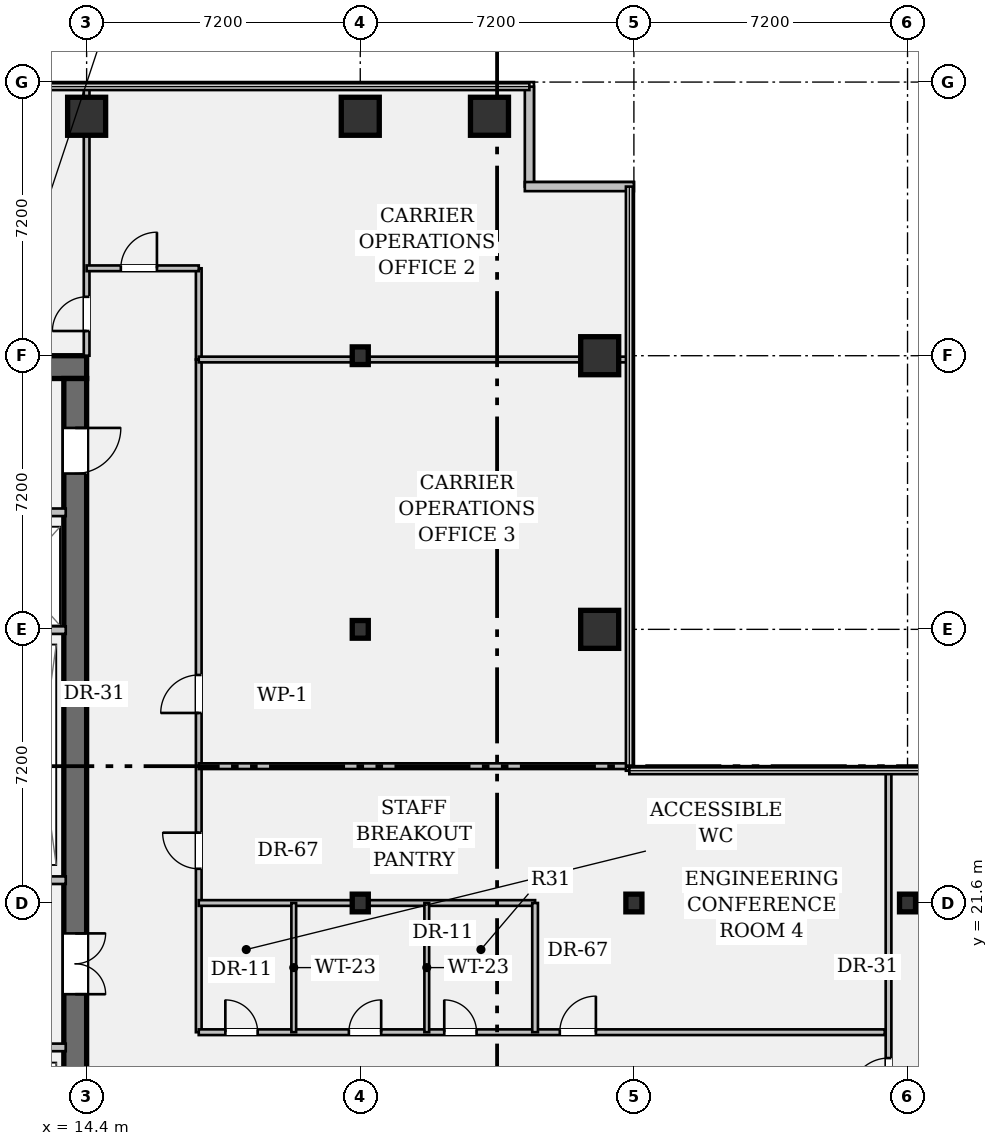
"""IFC4 building model, lengths in metres.
Left out: names, types, materials, properties, quantities, classifications, styles, units other than length and angle.
Written with IfcOpenShell. Run it as: python <this file> out.ifc"""

import sys

from ifc_helpers import new_model, si_unit, direction, frame, frame_2d, origin, origin_2d, place, context, subcontext, project, spatial, rectangle, hollow_rectangle, i_section, extrude, element, fill, save


model = new_model("IFC4")
c1 = context("Model", 3, precision=1e-05, world=origin(), true_north=direction((0.0, 1.0)))
c2 = subcontext(c1, "Body", "Model", "MODEL_VIEW")
j1 = project(units=[si_unit("LENGTHUNIT", "METRE"), si_unit("PLANEANGLEUNIT", "RADIAN")], contexts=[c1])
p1 = place(None, origin())
s1 = spatial("IfcSite", under=j1, at=p1, CompositionType="ELEMENT")
p2 = place(p1, origin())
s2 = spatial("IfcBuilding", under=s1, at=p2, CompositionType="ELEMENT")
p3 = place(p2, frame((0.0, 0.0, 46.55)))
s3 = spatial("IfcBuildingStorey", under=s2, at=p3, CompositionType="ELEMENT", Elevation=46.55)
p4 = place(p3, frame((0.6, 35.7, 0.0), z_axis=(0.0, 0.0, 1.0), x_axis=(1.0, 0.0, 0.0)))
e1 = element("IfcWall", 1, at=p4, inside=s3, PredefinedType="SHEAR", context=c2, shape_type="SweptSolid", body=[
    extrude(rectangle(XDim=13.8, YDim=0.6, at=frame_2d((6.9, 0.0))), origin(), (0.0, 0.0, 1.0), 3.57),
])
p5 = place(p3, frame((14.1, 35.4, 0.0), z_axis=(0.0, 0.0, 1.0), x_axis=(0.0, -1.0, 0.0)))
e2 = element("IfcWall", 2, at=p5, inside=s3, PredefinedType="SHEAR", context=c2, shape_type="SweptSolid", body=[
    extrude(rectangle(XDim=27.6, YDim=0.6, at=frame_2d((13.8, 0.0))), origin(), (0.0, 0.0, 1.0), 3.57),
])
p6 = place(p5, frame((1.3, 0.0, 0.0)))
e3 = element("IfcOpeningElement", 3, at=p6, cuts=e2, PredefinedType="OPENING", context=c2, shape_type="SweptSolid", body=[
    extrude(rectangle(XDim=1.2, YDim=2.15, at=frame_2d((0.6, 1.075))), frame((0.0, 0.312, 0.0), z_axis=(0.0, -1.0, 0.0), x_axis=(1.0, 0.0, 0.0)), (0.0, 0.0, 1.0), 0.624),
])
p7 = place(p5, frame((25.25, 0.0, 0.0)))
e4 = element("IfcOpeningElement", 4, at=p7, cuts=e2, PredefinedType="OPENING", context=c2, shape_type="SweptSolid", body=[
    extrude(rectangle(XDim=1.2, YDim=2.15, at=frame_2d((0.6, 1.075))), frame((0.0, 0.312, 0.0), z_axis=(0.0, -1.0, 0.0), x_axis=(1.0, 0.0, 0.0)), (0.0, 0.0, 1.0), 0.624),
])
p8 = place(p5, frame((14.6, 0.0, 0.0)))
e5 = element("IfcOpeningElement", 5, at=p8, cuts=e2, PredefinedType="OPENING", context=c2, shape_type="SweptSolid", body=[
    extrude(rectangle(XDim=1.6, YDim=2.2, at=frame_2d((0.8, 1.1))), frame((0.0, 0.312, 0.0), z_axis=(0.0, -1.0, 0.0), x_axis=(1.0, 0.0, 0.0)), (0.0, 0.0, 1.0), 0.624),
])
p9 = place(p3, frame((14.4, 42.3, 0.0), z_axis=(0.0, 0.0, 1.0), x_axis=(1.0, 0.0, 0.0)))
e6 = element("IfcColumn", 6, at=p9, inside=s3, PredefinedType="COLUMN", context=c2, shape_type="SweptSolid", body=[
    extrude(hollow_rectangle(XDim=1.0, YDim=1.0, WallThickness=0.065, at=origin_2d()), origin(), (0.0, 0.0, 1.0), 3.57),
])
for number, where, z_axis, x_axis in (
    (7, (21.6, 21.6, 0.0), (0.0, 0.0, 1.0), (1.0, 0.0, 0.0)),
    (8, (21.6, 28.8, 0.0), (0.0, 0.0, 1.0), (1.0, 0.0, 0.0)),
    (9, (21.6, 36.0, 0.0), (0.0, 0.0, 1.0), (1.0, 0.0, 0.0)),
):
    element("IfcColumn", number, at=place(p3, frame(where, z_axis=z_axis, x_axis=x_axis)), inside=s3, PredefinedType="COLUMN", context=c2, shape_type="SweptSolid", body=[
        extrude(i_section(OverallWidth=0.422, OverallDepth=0.465, WebThickness=0.045, FlangeThickness=0.073, FilletRadius=0.018, at=origin_2d()), origin(), (0.0, 0.0, 1.0), 3.57),
    ])
for number, where, z_axis, x_axis in (
    (10, (21.6, 42.3, 0.0), (0.0, 0.0, 1.0), (1.0, 0.0, 0.0)),
    (11, (25.0, 42.3, 0.0), (0.0, 0.0, 1.0), (1.0, 0.0, 0.0)),
    (12, (27.9, 28.8, 0.0), (0.0, 0.0, 1.0), (1.0, 0.0, 0.0)),
    (13, (27.9, 36.0, 0.0), (0.0, 0.0, 1.0), (1.0, 0.0, 0.0)),
):
    element("IfcColumn", number, at=place(p3, frame(where, z_axis=z_axis, x_axis=x_axis)), inside=s3, PredefinedType="COLUMN", context=c2, shape_type="SweptSolid", body=[
        extrude(hollow_rectangle(XDim=1.0, YDim=1.0, WallThickness=0.065, at=origin_2d()), origin(), (0.0, 0.0, 1.0), 3.57),
    ])
for number, where, z_axis, x_axis in (
    (14, (28.8, 21.6, 0.0), (0.0, 0.0, 1.0), (1.0, 0.0, 0.0)),
    (15, (36.0, 21.6, 0.0), (0.0, 0.0, 1.0), (1.0, 0.0, 0.0)),
):
    element("IfcColumn", number, at=place(p3, frame(where, z_axis=z_axis, x_axis=x_axis)), inside=s3, PredefinedType="COLUMN", context=c2, shape_type="SweptSolid", body=[
        extrude(i_section(OverallWidth=0.422, OverallDepth=0.465, WebThickness=0.045, FlangeThickness=0.073, FilletRadius=0.018, at=origin_2d()), origin(), (0.0, 0.0, 1.0), 3.57),
    ])
p10 = place(p3, frame((26.05, 43.08, 0.0), z_axis=(0.0, 0.0, 1.0), x_axis=(0.0, -1.0, 0.0)))
e16 = element("IfcWall", 16, at=p10, inside=s3, PredefinedType="STANDARD", context=c2, shape_type="SweptSolid", body=[
    extrude(rectangle(XDim=2.63, YDim=0.24, at=frame_2d((1.315, 0.0))), origin(), (0.0, 0.0, 1.0), 3.57),
])
p11 = place(p3, frame((25.93, 40.45, 0.0), z_axis=(0.0, 0.0, 1.0), x_axis=(1.0, 0.0, 0.0)))
e17 = element("IfcWall", 17, at=p11, inside=s3, PredefinedType="STANDARD", context=c2, shape_type="SweptSolid", body=[
    extrude(rectangle(XDim=2.87, YDim=0.24, at=frame_2d((1.435, 0.0))), origin(), (0.0, 0.0, 1.0), 3.57),
])
p12 = place(p3, frame((8.7, 31.88, 0.0), z_axis=(0.0, 0.0, 1.0), x_axis=(1.0, 0.0, 0.0)))
e18 = element("IfcWall", 18, at=p12, inside=s3, PredefinedType="PARTITIONING", context=c2, shape_type="SweptSolid", body=[
    extrude(rectangle(XDim=5.15, YDim=0.2, at=frame_2d((2.575, 0.0))), origin(), (0.0, 0.0, 1.0), 3.57),
])
p13 = place(p12, frame((0.75, 0.0, 0.0)))
e19 = element("IfcOpeningElement", 19, at=p13, cuts=e18, PredefinedType="OPENING", context=c2, shape_type="SweptSolid", body=[
    extrude(rectangle(XDim=1.2, YDim=2.2, at=frame_2d((0.6, 1.1))), frame((0.0, 0.112, 0.0), z_axis=(0.0, -1.0, 0.0), x_axis=(1.0, 0.0, 0.0)), (0.0, 0.0, 1.0), 0.224),
])
p14 = place(p12, frame((3.25, 0.0, 0.0)))
e20 = element("IfcOpeningElement", 20, at=p14, cuts=e18, PredefinedType="OPENING", context=c2, shape_type="SweptSolid", body=[
    extrude(rectangle(XDim=1.2, YDim=2.2, at=frame_2d((0.6, 1.1))), frame((0.0, 0.112, 0.0), z_axis=(0.0, -1.0, 0.0), x_axis=(1.0, 0.0, 0.0)), (0.0, 0.0, 1.0), 0.224),
])
p15 = place(p3, frame((8.7, 28.78, 0.0), z_axis=(0.0, 0.0, 1.0), x_axis=(1.0, 0.0, 0.0)))
e21 = element("IfcWall", 21, at=p15, inside=s3, PredefinedType="PARTITIONING", context=c2, shape_type="SweptSolid", body=[
    extrude(rectangle(XDim=5.15, YDim=0.2, at=frame_2d((2.575, 0.0))), origin(), (0.0, 0.0, 1.0), 3.57),
])
for number, where, z_axis, x_axis in (
    (22, (7.1, 22.2, 0.0), (0.0, 0.0, 1.0), (1.0, 0.0, 0.0)),
    (23, (7.1, 17.8, 0.0), (0.0, 0.0, 1.0), (1.0, 0.0, 0.0)),
):
    element("IfcWall", number, at=place(p3, frame(where, z_axis=z_axis, x_axis=x_axis)), inside=s3, PredefinedType="PARTITIONING", context=c2, shape_type="SweptSolid", body=[
        extrude(rectangle(XDim=6.75, YDim=0.2, at=frame_2d((3.375, 0.0))), origin(), (0.0, 0.0, 1.0), 3.57),
    ])
p16 = place(p3, frame((17.35, 18.2, 0.0), z_axis=(0.0, 0.0, 1.0), x_axis=(0.0, 1.0, 0.0)))
e24 = element("IfcWall", 24, at=p16, inside=s3, PredefinedType="PARTITIONING", context=c2, shape_type="SweptSolid", body=[
    extrude(rectangle(XDim=17.7, YDim=0.15, at=frame_2d((8.85, 0.0))), origin(), (0.0, 0.0, 1.0), 2.699),
])
p17 = place(p16, frame((4.3, 0.0, 0.0)))
e25 = element("IfcOpeningElement", 25, at=p17, cuts=e24, PredefinedType="OPENING", context=c2, shape_type="SweptSolid", body=[
    extrude(rectangle(XDim=0.95, YDim=2.15, at=frame_2d((0.475, 1.075))), frame((0.0, 0.087, 0.0), z_axis=(0.0, -1.0, 0.0), x_axis=(1.0, 0.0, 0.0)), (0.0, 0.0, 1.0), 0.174),
])
p18 = place(p16, frame((8.4, 0.0, 0.0)))
e26 = element("IfcOpeningElement", 26, at=p18, cuts=e24, PredefinedType="OPENING", context=c2, shape_type="SweptSolid", body=[
    extrude(rectangle(XDim=1.0, YDim=2.15, at=frame_2d((0.5, 1.075))), frame((0.0, 0.087, 0.0), z_axis=(0.0, -1.0, 0.0), x_axis=(1.0, 0.0, 0.0)), (0.0, 0.0, 1.0), 0.174),
])
p19 = place(p3, frame((17.35, 18.2, 0.0), z_axis=(0.0, 0.0, 1.0), x_axis=(1.0, 0.0, 0.0)))
e27 = element("IfcWall", 27, at=p19, inside=s3, PredefinedType="PARTITIONING", context=c2, shape_type="SweptSolid", body=[
    extrude(rectangle(XDim=18.05, YDim=0.15, at=frame_2d((9.025, 0.0))), origin(), (0.0, 0.0, 1.0), 2.699),
])
p20 = place(p19, frame((0.7, 0.0, 0.0)))
e28 = element("IfcOpeningElement", 28, at=p20, cuts=e27, PredefinedType="OPENING", context=c2, shape_type="SweptSolid", body=[
    extrude(rectangle(XDim=0.85, YDim=2.15, at=frame_2d((0.425, 1.075))), frame((0.0, 0.087, 0.0), z_axis=(0.0, -1.0, 0.0), x_axis=(1.0, 0.0, 0.0)), (0.0, 0.0, 1.0), 0.174),
])
p21 = place(p19, frame((3.95, 0.0, 0.0)))
e29 = element("IfcOpeningElement", 29, at=p21, cuts=e27, PredefinedType="OPENING", context=c2, shape_type="SweptSolid", body=[
    extrude(rectangle(XDim=0.85, YDim=2.15, at=frame_2d((0.425, 1.075))), frame((0.0, 0.087, 0.0), z_axis=(0.0, -1.0, 0.0), x_axis=(1.0, 0.0, 0.0)), (0.0, 0.0, 1.0), 0.174),
])
p22 = place(p19, frame((6.46, 0.0, 0.0)))
e30 = element("IfcOpeningElement", 30, at=p22, cuts=e27, PredefinedType="OPENING", context=c2, shape_type="SweptSolid", body=[
    extrude(rectangle(XDim=0.85, YDim=2.15, at=frame_2d((0.425, 1.075))), frame((0.0, 0.087, 0.0), z_axis=(0.0, -1.0, 0.0), x_axis=(1.0, 0.0, 0.0)), (0.0, 0.0, 1.0), 0.174),
])
p23 = place(p19, frame((9.5, 0.0, 0.0)))
e31 = element("IfcOpeningElement", 31, at=p23, cuts=e27, PredefinedType="OPENING", context=c2, shape_type="SweptSolid", body=[
    extrude(rectangle(XDim=0.95, YDim=2.15, at=frame_2d((0.475, 1.075))), frame((0.0, 0.087, 0.0), z_axis=(0.0, -1.0, 0.0), x_axis=(1.0, 0.0, 0.0)), (0.0, 0.0, 1.0), 0.174),
])
p24 = place(p3, frame((35.5, 0.12, 0.0), z_axis=(0.0, 0.0, 1.0), x_axis=(0.0, 1.0, 0.0)))
e32 = element("IfcWall", 32, at=p24, inside=s3, PredefinedType="PARTITIONING", context=c2, shape_type="SweptSolid", body=[
    extrude(rectangle(XDim=24.96, YDim=0.15, at=frame_2d((12.48, 0.0))), origin(), (0.0, 0.0, 1.0), 2.699),
])
p25 = place(p24, frame((16.4, 0.0, 0.0)))
e33 = element("IfcOpeningElement", 33, at=p25, cuts=e32, PredefinedType="OPENING", context=c2, shape_type="SweptSolid", body=[
    extrude(rectangle(XDim=1.0, YDim=2.15, at=frame_2d((0.5, 1.075))), frame((0.0, 0.087, 0.0), z_axis=(0.0, -1.0, 0.0), x_axis=(1.0, 0.0, 0.0)), (0.0, 0.0, 1.0), 0.174),
])
p26 = place(p3, frame((14.4, 36.0, 0.0), z_axis=(0.0, 0.0, 1.0), x_axis=(0.0, 1.0, 0.0)))
e34 = element("IfcWall", 34, at=p26, inside=s3, PredefinedType="PARTITIONING", context=c2, shape_type="SweptSolid", body=[
    extrude(rectangle(XDim=7.08, YDim=0.15, at=frame_2d((3.54, 0.0))), origin(), (0.0, 0.0, 1.0), 2.699),
])
p27 = place(p26, frame((0.65, 0.0, 0.0)))
e35 = element("IfcOpeningElement", 35, at=p27, cuts=e34, PredefinedType="OPENING", context=c2, shape_type="SweptSolid", body=[
    extrude(rectangle(XDim=0.9, YDim=2.15, at=frame_2d((0.45, 1.075))), frame((0.0, 0.087, 0.0), z_axis=(0.0, -1.0, 0.0), x_axis=(1.0, 0.0, 0.0)), (0.0, 0.0, 1.0), 0.174),
])
p28 = place(p3, frame((17.35, 35.9, 0.0), z_axis=(0.0, 0.0, 1.0), x_axis=(0.0, 1.0, 0.0)))
e36 = element("IfcWall", 36, at=p28, inside=s3, PredefinedType="PARTITIONING", context=c2, shape_type="SweptSolid", body=[
    extrude(rectangle(XDim=2.4, YDim=0.15, at=frame_2d((1.2, 0.0))), origin(), (0.0, 0.0, 1.0), 2.699),
])
p29 = place(p3, frame((14.4, 38.3, 0.0), z_axis=(0.0, 0.0, 1.0), x_axis=(1.0, 0.0, 0.0)))
e37 = element("IfcWall", 37, at=p29, inside=s3, PredefinedType="PARTITIONING", context=c2, shape_type="SweptSolid", body=[
    extrude(rectangle(XDim=2.95, YDim=0.15, at=frame_2d((1.475, 0.0))), origin(), (0.0, 0.0, 1.0), 2.699),
])
p30 = place(p29, frame((0.9, 0.0, 0.0)))
e38 = element("IfcOpeningElement", 38, at=p30, cuts=e37, PredefinedType="OPENING", context=c2, shape_type="SweptSolid", body=[
    extrude(rectangle(XDim=0.95, YDim=2.15, at=frame_2d((0.475, 1.075))), frame((0.0, 0.087, 0.0), z_axis=(0.0, -1.0, 0.0), x_axis=(1.0, 0.0, 0.0)), (0.0, 0.0, 1.0), 0.174),
])
p31 = place(p3, frame((17.35, 35.9, 0.0), z_axis=(0.0, 0.0, 1.0), x_axis=(1.0, 0.0, 0.0)))
e39 = element("IfcWall", 39, at=p31, inside=s3, PredefinedType="PARTITIONING", context=c2, shape_type="SweptSolid", body=[
    extrude(rectangle(XDim=11.33, YDim=0.15, at=frame_2d((5.665, 0.0))), origin(), (0.0, 0.0, 1.0), 2.699),
])
p32 = place(p3, frame((17.35, 21.6, 0.0), z_axis=(0.0, 0.0, 1.0), x_axis=(1.0, 0.0, 0.0)))
e40 = element("IfcWall", 40, at=p32, inside=s3, PredefinedType="PARTITIONING", context=c2, shape_type="SweptSolid", body=[
    extrude(rectangle(XDim=8.85, YDim=0.15, at=frame_2d((4.425, 0.0))), origin(), (0.0, 0.0, 1.0), 2.699),
])
p33 = place(p3, frame((26.2, 18.2, 0.0), z_axis=(0.0, 0.0, 1.0), x_axis=(0.0, 1.0, 0.0)))
e41 = element("IfcWall", 41, at=p33, inside=s3, PredefinedType="PARTITIONING", context=c2, shape_type="SweptSolid", body=[
    extrude(rectangle(XDim=3.4, YDim=0.15, at=frame_2d((1.7, 0.0))), origin(), (0.0, 0.0, 1.0), 2.699),
])
for number, where, z_axis, x_axis in (
    (42, (19.85, 18.2, 0.0), (0.0, 0.0, 1.0), (0.0, 1.0, 0.0)),
    (43, (23.35, 18.2, 0.0), (0.0, 0.0, 1.0), (0.0, 1.0, 0.0)),
):
    element("IfcWall", number, at=place(p3, frame(where, z_axis=z_axis, x_axis=x_axis)), inside=s3, PredefinedType="PARTITIONING", context=c2, shape_type="SweptSolid", body=[
        extrude(rectangle(XDim=3.4, YDim=0.125, at=frame_2d((1.7, 0.0))), origin(), (0.0, 0.0, 1.0), 2.699),
    ])
p34 = place(p3, frame((17.35, 25.2, 0.0), z_axis=(0.0, 0.0, 1.0), x_axis=(1.0, 0.0, 0.0)))
e44 = element("IfcWall", 44, at=p34, inside=s3, PredefinedType="PARTITIONING", context=c2, shape_type="SweptSolid", body=[
    extrude(rectangle(XDim=11.33, YDim=0.15, at=frame_2d((5.665, 0.0))), origin(), (0.0, 0.0, 1.0), 2.699),
])
p35 = place(p6, origin())
e45 = element("IfcDoor", 45, at=p35, inside=s3, OperationType="SINGLE_SWING_LEFT", PredefinedType="DOOR", context=c2, shape_type="SweptSolid", body=[
    extrude(rectangle(XDim=1.2, YDim=2.15, at=frame_2d((0.6, 1.075))), frame((0.0, 0.025, 0.0), z_axis=(0.0, -1.0, 0.0), x_axis=(1.0, 0.0, 0.0)), (0.0, 0.0, 1.0), 0.05),
])
fill(e3, e45)
p36 = place(p8, origin())
e46 = element("IfcDoor", 46, at=p36, inside=s3, OperationType="DOUBLE_DOOR_SINGLE_SWING", PredefinedType="DOOR", context=c2, shape_type="SweptSolid", body=[
    extrude(rectangle(XDim=1.6, YDim=2.2, at=frame_2d((0.8, 1.1))), frame((0.0, 0.025, 0.0), z_axis=(0.0, -1.0, 0.0), x_axis=(1.0, 0.0, 0.0)), (0.0, 0.0, 1.0), 0.05),
])
fill(e5, e46)
p37 = place(p27, origin())
e47 = element("IfcDoor", 47, at=p37, inside=s3, OperationType="SINGLE_SWING_LEFT", PredefinedType="DOOR", context=c2, shape_type="SweptSolid", body=[
    extrude(rectangle(XDim=0.9, YDim=2.15, at=frame_2d((0.45, 1.075))), frame((0.0, 0.025, 0.0), z_axis=(0.0, -1.0, 0.0), x_axis=(1.0, 0.0, 0.0)), (0.0, 0.0, 1.0), 0.05),
])
fill(e35, e47)
p38 = place(p30, origin())
e48 = element("IfcDoor", 48, at=p38, inside=s3, OperationType="SINGLE_SWING_RIGHT", PredefinedType="DOOR", context=c2, shape_type="SweptSolid", body=[
    extrude(rectangle(XDim=0.95, YDim=2.15, at=frame_2d((0.475, 1.075))), frame((0.0, 0.025, 0.0), z_axis=(0.0, -1.0, 0.0), x_axis=(1.0, 0.0, 0.0)), (0.0, 0.0, 1.0), 0.05),
])
fill(e38, e48)
p39 = place(p20, origin())
e49 = element("IfcDoor", 49, at=p39, inside=s3, OperationType="SINGLE_SWING_LEFT", PredefinedType="DOOR", context=c2, shape_type="SweptSolid", body=[
    extrude(rectangle(XDim=0.85, YDim=2.15, at=frame_2d((0.425, 1.075))), frame((0.0, 0.025, 0.0), z_axis=(0.0, -1.0, 0.0), x_axis=(1.0, 0.0, 0.0)), (0.0, 0.0, 1.0), 0.05),
])
fill(e28, e49)
p40 = place(p21, origin())
e50 = element("IfcDoor", 50, at=p40, inside=s3, OperationType="SINGLE_SWING_RIGHT", PredefinedType="DOOR", context=c2, shape_type="SweptSolid", body=[
    extrude(rectangle(XDim=0.85, YDim=2.15, at=frame_2d((0.425, 1.075))), frame((0.0, 0.025, 0.0), z_axis=(0.0, -1.0, 0.0), x_axis=(1.0, 0.0, 0.0)), (0.0, 0.0, 1.0), 0.05),
])
fill(e29, e50)
p41 = place(p22, origin())
e51 = element("IfcDoor", 51, at=p41, inside=s3, OperationType="SINGLE_SWING_LEFT", PredefinedType="DOOR", context=c2, shape_type="SweptSolid", body=[
    extrude(rectangle(XDim=0.85, YDim=2.15, at=frame_2d((0.425, 1.075))), frame((0.0, 0.025, 0.0), z_axis=(0.0, -1.0, 0.0), x_axis=(1.0, 0.0, 0.0)), (0.0, 0.0, 1.0), 0.05),
])
fill(e30, e51)
p42 = place(p17, origin())
e52 = element("IfcDoor", 52, at=p42, inside=s3, OperationType="SINGLE_SWING_RIGHT", PredefinedType="DOOR", context=c2, shape_type="SweptSolid", body=[
    extrude(rectangle(XDim=0.95, YDim=2.15, at=frame_2d((0.475, 1.075))), frame((0.0, 0.025, 0.0), z_axis=(0.0, -1.0, 0.0), x_axis=(1.0, 0.0, 0.0)), (0.0, 0.0, 1.0), 0.05),
])
fill(e25, e52)
p43 = place(p18, origin())
e53 = element("IfcDoor", 53, at=p43, inside=s3, OperationType="SINGLE_SWING_LEFT", PredefinedType="DOOR", context=c2, shape_type="SweptSolid", body=[
    extrude(rectangle(XDim=1.0, YDim=2.15, at=frame_2d((0.5, 1.075))), frame((0.0, 0.025, 0.0), z_axis=(0.0, -1.0, 0.0), x_axis=(1.0, 0.0, 0.0)), (0.0, 0.0, 1.0), 0.05),
])
fill(e26, e53)
p44 = place(p23, origin())
e54 = element("IfcDoor", 54, at=p44, inside=s3, OperationType="SINGLE_SWING_RIGHT", PredefinedType="DOOR", context=c2, shape_type="SweptSolid", body=[
    extrude(rectangle(XDim=0.95, YDim=2.15, at=frame_2d((0.475, 1.075))), frame((0.0, 0.025, 0.0), z_axis=(0.0, -1.0, 0.0), x_axis=(1.0, 0.0, 0.0)), (0.0, 0.0, 1.0), 0.05),
])
fill(e31, e54)
p45 = place(p25, origin())
e55 = element("IfcDoor", 55, at=p45, inside=s3, OperationType="SINGLE_SWING_LEFT", PredefinedType="DOOR", context=c2, shape_type="SweptSolid", body=[
    extrude(rectangle(XDim=1.0, YDim=2.15, at=frame_2d((0.5, 1.075))), frame((0.0, 0.025, 0.0), z_axis=(0.0, -1.0, 0.0), x_axis=(1.0, 0.0, 0.0)), (0.0, 0.0, 1.0), 0.05),
])
fill(e33, e55)
save(model, sys.argv[1])
